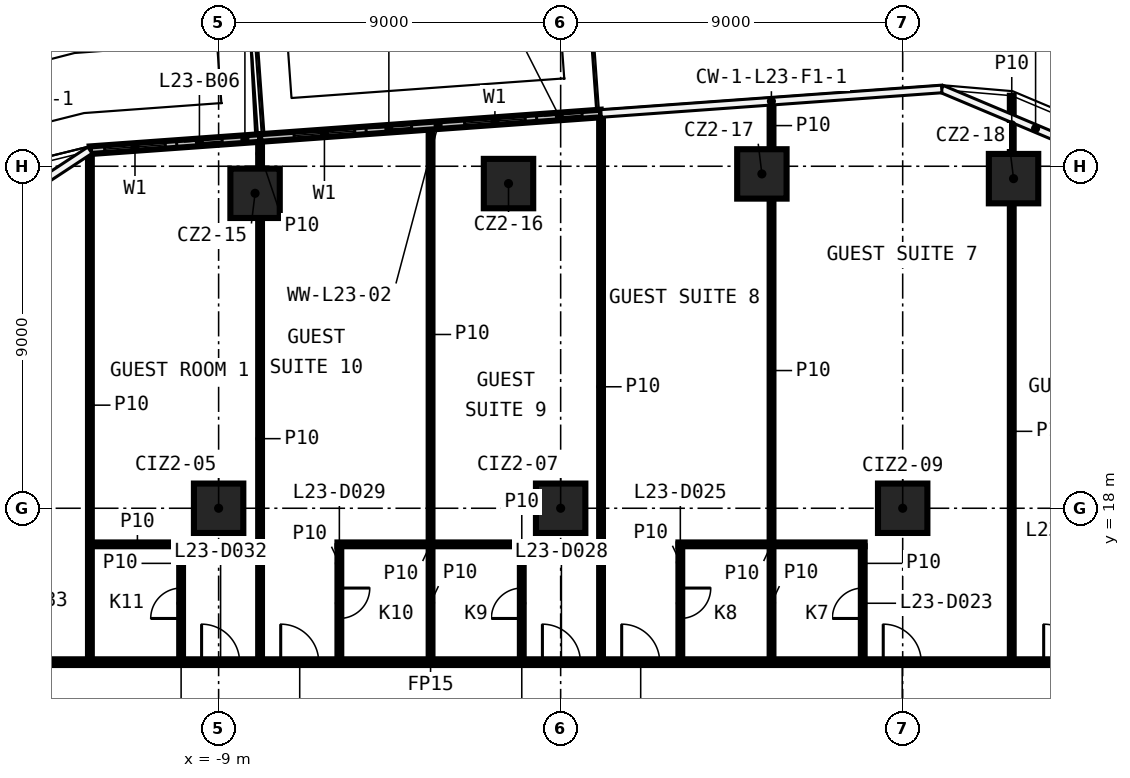
"""IFC4 building model, lengths in metres.
Left out: names, types, materials, properties, quantities, classifications, styles, units other than length and angle.
Written with IfcOpenShell. Run it as: python <this file> out.ifc"""

import sys

from ifc_helpers import new_model, si_unit, direction, frame, frame_2d, origin, origin_2d, place, context, subcontext, project, spatial, rectangle, extrude, element, fill, save


model = new_model("IFC4")
c1 = context("Model", 3, precision=1e-05, world=origin(), true_north=direction((0.0, 1.0)))
c2 = subcontext(c1, "Body", "Model", "MODEL_VIEW")
j1 = project(units=[si_unit("LENGTHUNIT", "METRE"), si_unit("PLANEANGLEUNIT", "RADIAN")], contexts=[c1])
p1 = place(None, origin())
s1 = spatial("IfcSite", under=j1, at=p1, CompositionType="ELEMENT")
p2 = place(p1, origin())
s2 = spatial("IfcBuilding", under=s1, at=p2, CompositionType="ELEMENT")
p3 = place(p2, frame((0.0, 0.0, 110.0)))
s3 = spatial("IfcBuildingStorey", under=s2, at=p3, CompositionType="ELEMENT", Elevation=110.0)
for number, where, z_axis, x_axis in (
    (1, (-8.041, 26.288, 0.0), (0.0, 0.0, 1.0), (1.0, 0.0, 0.0)),
    (2, (-1.372, 26.544, 0.0), (0.0, 0.0, 1.0), (1.0, 0.0, 0.0)),
    (3, (5.295, 26.798, 0.0), (0.0, 0.0, 1.0), (1.0, 0.0, 0.0)),
    (4, (11.917, 26.674, 0.0), (0.0, 0.0, 1.0), (1.0, 0.0, 0.0)),
    (5, (-9.0, 18.0, 0.0), (0.0, 0.0, 1.0), (1.0, 0.0, 0.0)),
    (6, (0.0, 18.0, 0.0), (0.0, 0.0, 1.0), (1.0, 0.0, 0.0)),
    (7, (9.0, 18.0, 0.0), (0.0, 0.0, 1.0), (1.0, 0.0, 0.0)),
):
    element("IfcColumn", number, at=place(p3, frame(where, z_axis=z_axis, x_axis=x_axis)), inside=s3, PredefinedType="COLUMN", context=c2, shape_type="SweptSolid", body=[
        extrude(rectangle(XDim=1.3, YDim=1.3, at=origin_2d()), origin(), (0.0, 0.0, 1.0), 3.3),
    ])
p4 = place(p3, frame((-17.025, 13.95, 0.0), z_axis=(0.0, 0.0, 1.0), x_axis=(1.0, 0.0, 0.0)))
e8 = element("IfcWall", 8, at=p4, inside=s3, PredefinedType="PARTITIONING", context=c2, shape_type="SweptSolid", body=[
    extrude(rectangle(XDim=34.05, YDim=0.15, at=frame_2d((17.025, 0.0))), origin(), (0.0, 0.0, 1.0), 3.3),
])
p5 = place(p4, frame((29.735, 0.0, 0.0)))
e9 = element("IfcOpeningElement", 9, at=p5, cuts=e8, PredefinedType="OPENING", context=c2, shape_type="SweptSolid", body=[
    extrude(rectangle(XDim=1.0, YDim=2.1, at=frame_2d((0.5, 1.05))), frame((0.0, 0.085, 0.0), z_axis=(0.0, -1.0, 0.0), x_axis=(1.0, 0.0, 0.0)), (0.0, 0.0, 1.0), 0.17),
])
p6 = place(p4, frame((25.513, 0.0, 0.0)))
e10 = element("IfcOpeningElement", 10, at=p6, cuts=e8, PredefinedType="OPENING", context=c2, shape_type="SweptSolid", body=[
    extrude(rectangle(XDim=1.0, YDim=2.1, at=frame_2d((0.5, 1.05))), frame((0.0, 0.085, 0.0), z_axis=(0.0, -1.0, 0.0), x_axis=(1.0, 0.0, 0.0)), (0.0, 0.0, 1.0), 0.17),
])
p7 = place(p4, frame((18.631, 0.0, 0.0)))
e11 = element("IfcOpeningElement", 11, at=p7, cuts=e8, PredefinedType="OPENING", context=c2, shape_type="SweptSolid", body=[
    extrude(rectangle(XDim=1.0, YDim=2.1, at=frame_2d((0.5, 1.05))), frame((0.0, 0.085, 0.0), z_axis=(0.0, -1.0, 0.0), x_axis=(1.0, 0.0, 0.0)), (0.0, 0.0, 1.0), 0.17),
])
p8 = place(p4, frame((16.545, 0.0, 0.0)))
e12 = element("IfcOpeningElement", 12, at=p8, cuts=e8, PredefinedType="OPENING", context=c2, shape_type="SweptSolid", body=[
    extrude(rectangle(XDim=1.0, YDim=2.1, at=frame_2d((0.5, 1.05))), frame((0.0, 0.085, 0.0), z_axis=(0.0, -1.0, 0.0), x_axis=(1.0, 0.0, 0.0)), (0.0, 0.0, 1.0), 0.17),
])
p9 = place(p4, frame((9.659, 0.0, 0.0)))
e13 = element("IfcOpeningElement", 13, at=p9, cuts=e8, PredefinedType="OPENING", context=c2, shape_type="SweptSolid", body=[
    extrude(rectangle(XDim=1.0, YDim=2.1, at=frame_2d((0.5, 1.05))), frame((0.0, 0.085, 0.0), z_axis=(0.0, -1.0, 0.0), x_axis=(1.0, 0.0, 0.0)), (0.0, 0.0, 1.0), 0.17),
])
p10 = place(p4, frame((7.577, 0.0, 0.0)))
e14 = element("IfcOpeningElement", 14, at=p10, cuts=e8, PredefinedType="OPENING", context=c2, shape_type="SweptSolid", body=[
    extrude(rectangle(XDim=1.0, YDim=2.1, at=frame_2d((0.5, 1.05))), frame((0.0, 0.085, 0.0), z_axis=(0.0, -1.0, 0.0), x_axis=(1.0, 0.0, 0.0)), (0.0, 0.0, 1.0), 0.17),
])
p11 = place(p4, frame((2.381, 0.0, 0.0)))
e15 = element("IfcOpeningElement", 15, at=p11, cuts=e8, PredefinedType="OPENING", context=c2, shape_type="SweptSolid", body=[
    extrude(rectangle(XDim=0.9, YDim=2.1, at=frame_2d((0.45, 1.05))), frame((0.0, 0.085, 0.0), z_axis=(0.0, -1.0, 0.0), x_axis=(1.0, 0.0, 0.0)), (0.0, 0.0, 1.0), 0.17),
])
p12 = place(p3, frame((-12.337, 17.05, 0.0), z_axis=(0.0, 0.0, 1.0), x_axis=(1.0, 0.0, 0.0)))
e16 = element("IfcWall", 16, at=p12, inside=s3, PredefinedType="PARTITIONING", context=c2, shape_type="SweptSolid", body=[
    extrude(rectangle(XDim=2.4, YDim=0.1, at=frame_2d((1.2, 0.0))), origin(), (0.0, 0.0, 1.0), 3.3),
])
for number, where, z_axis, x_axis in (
    (17, (-5.873, 17.05, 0.0), (0.0, 0.0, 1.0), (1.0, 0.0, 0.0)),
    (18, (3.099, 17.05, 0.0), (0.0, 0.0, 1.0), (1.0, 0.0, 0.0)),
):
    element("IfcWall", number, at=place(p3, frame(where, z_axis=z_axis, x_axis=x_axis)), inside=s3, PredefinedType="PARTITIONING", context=c2, shape_type="SweptSolid", body=[
        extrude(rectangle(XDim=4.9, YDim=0.1, at=frame_2d((2.45, 0.0))), origin(), (0.0, 0.0, 1.0), 3.3),
    ])
p13 = place(p3, frame((11.87, 14.025, 0.0), z_axis=(0.0, 0.0, 1.0), x_axis=(0.0, 1.0, 0.0)))
e19 = element("IfcWall", 19, at=p13, inside=s3, PredefinedType="PARTITIONING", context=c2, shape_type="SweptSolid", body=[
    extrude(rectangle(XDim=11.999, YDim=0.1, at=frame_2d((6.0, 0.0))), origin(), (0.0, 0.0, 1.0), 3.3),
])
p14 = place(p3, frame((11.87, 27.324, 0.0), z_axis=(0.0, 0.0, 1.0), x_axis=(0.0, 1.0, 0.0)))
e20 = element("IfcWall", 20, at=p14, inside=s3, PredefinedType="PARTITIONING", context=c2, shape_type="SweptSolid", body=[
    extrude(rectangle(XDim=1.531, YDim=0.1, at=frame_2d((0.766, 0.0))), origin(), (0.0, 0.0, 1.0), 3.3),
])
p15 = place(p3, frame((7.949, 14.025, 0.0), z_axis=(0.0, 0.0, 1.0), x_axis=(0.0, 1.0, 0.0)))
e21 = element("IfcWall", 21, at=p15, inside=s3, PredefinedType="PARTITIONING", context=c2, shape_type="SweptSolid", body=[
    extrude(rectangle(XDim=2.975, YDim=0.1, at=frame_2d((1.488, 0.0))), origin(), (0.0, 0.0, 1.0), 3.3),
])
p16 = place(p15, frame((1.075, 0.0, 0.0)))
e22 = element("IfcOpeningElement", 22, at=p16, cuts=e21, PredefinedType="OPENING", context=c2, shape_type="SweptSolid", body=[
    extrude(rectangle(XDim=0.8, YDim=2.1, at=frame_2d((0.4, 1.05))), frame((0.0, 0.06, 0.0), z_axis=(0.0, -1.0, 0.0), x_axis=(1.0, 0.0, 0.0)), (0.0, 0.0, 1.0), 0.12),
])
p17 = place(p3, frame((5.549, 14.025, 0.0), z_axis=(0.0, 0.0, 1.0), x_axis=(0.0, 1.0, 0.0)))
e23 = element("IfcWall", 23, at=p17, inside=s3, PredefinedType="PARTITIONING", context=c2, shape_type="SweptSolid", body=[
    extrude(rectangle(XDim=2.975, YDim=0.1, at=frame_2d((1.488, 0.0))), origin(), (0.0, 0.0, 1.0), 3.3),
])
p18 = place(p3, frame((5.549, 17.1, 0.0), z_axis=(0.0, 0.0, 1.0), x_axis=(0.0, 1.0, 0.0)))
e24 = element("IfcWall", 24, at=p18, inside=s3, PredefinedType="PARTITIONING", context=c2, shape_type="SweptSolid", body=[
    extrude(rectangle(XDim=9.048, YDim=0.1, at=frame_2d((4.524, 0.0))), origin(), (0.0, 0.0, 1.0), 3.3),
])
p19 = place(p3, frame((5.549, 27.448, 0.0), z_axis=(0.0, 0.0, 1.0), x_axis=(0.0, 1.0, 0.0)))
e25 = element("IfcWall", 25, at=p19, inside=s3, PredefinedType="PARTITIONING", context=c2, shape_type="SweptSolid", body=[
    extrude(rectangle(XDim=1.243, YDim=0.1, at=frame_2d((0.622, 0.0))), origin(), (0.0, 0.0, 1.0), 3.3),
])
p20 = place(p3, frame((3.149, 17.05, 0.0), z_axis=(0.0, 0.0, 1.0), x_axis=(0.0, -1.0, 0.0)))
e26 = element("IfcWall", 26, at=p20, inside=s3, PredefinedType="PARTITIONING", context=c2, shape_type="SweptSolid", body=[
    extrude(rectangle(XDim=3.025, YDim=0.1, at=frame_2d((1.513, 0.0))), origin(), (0.0, 0.0, 1.0), 3.3),
])
p21 = place(p20, frame((1.15, 0.0, 0.0)))
e27 = element("IfcOpeningElement", 27, at=p21, cuts=e26, PredefinedType="OPENING", context=c2, shape_type="SweptSolid", body=[
    extrude(rectangle(XDim=0.8, YDim=2.1, at=frame_2d((0.4, 1.05))), frame((0.0, 0.06, 0.0), z_axis=(0.0, -1.0, 0.0), x_axis=(1.0, 0.0, 0.0)), (0.0, 0.0, 1.0), 0.12),
])
p22 = place(p3, frame((1.063, 14.025, 0.0), z_axis=(0.0, 0.0, 1.0), x_axis=(0.0, 1.0, 0.0)))
e28 = element("IfcWall", 28, at=p22, inside=s3, PredefinedType="PARTITIONING", context=c2, shape_type="SweptSolid", body=[
    extrude(rectangle(XDim=14.344, YDim=0.1, at=frame_2d((7.172, 0.0))), origin(), (0.0, 0.0, 1.0), 3.3),
])
p23 = place(p3, frame((-1.023, 14.025, 0.0), z_axis=(0.0, 0.0, 1.0), x_axis=(0.0, 1.0, 0.0)))
e29 = element("IfcWall", 29, at=p23, inside=s3, PredefinedType="PARTITIONING", context=c2, shape_type="SweptSolid", body=[
    extrude(rectangle(XDim=3.025, YDim=0.1, at=frame_2d((1.513, 0.0))), origin(), (0.0, 0.0, 1.0), 3.3),
])
p24 = place(p23, frame((1.075, 0.0, 0.0)))
e30 = element("IfcOpeningElement", 30, at=p24, cuts=e29, PredefinedType="OPENING", context=c2, shape_type="SweptSolid", body=[
    extrude(rectangle(XDim=0.8, YDim=2.1, at=frame_2d((0.4, 1.05))), frame((0.0, 0.06, 0.0), z_axis=(0.0, -1.0, 0.0), x_axis=(1.0, 0.0, 0.0)), (0.0, 0.0, 1.0), 0.12),
])
p25 = place(p3, frame((-3.423, 14.025, 0.0), z_axis=(0.0, 0.0, 1.0), x_axis=(0.0, 1.0, 0.0)))
e31 = element("IfcWall", 31, at=p25, inside=s3, PredefinedType="PARTITIONING", context=c2, shape_type="SweptSolid", body=[
    extrude(rectangle(XDim=2.975, YDim=0.1, at=frame_2d((1.488, 0.0))), origin(), (0.0, 0.0, 1.0), 3.3),
])
p26 = place(p3, frame((-3.423, 17.1, 0.0), z_axis=(0.0, 0.0, 1.0), x_axis=(0.0, 1.0, 0.0)))
e32 = element("IfcWall", 32, at=p26, inside=s3, PredefinedType="PARTITIONING", context=c2, shape_type="SweptSolid", body=[
    extrude(rectangle(XDim=10.946, YDim=0.1, at=frame_2d((5.473, 0.0))), origin(), (0.0, 0.0, 1.0), 3.3),
])
p27 = place(p3, frame((-5.823, 17.0, 0.0), z_axis=(0.0, 0.0, 1.0), x_axis=(0.0, -1.0, 0.0)))
e33 = element("IfcWall", 33, at=p27, inside=s3, PredefinedType="PARTITIONING", context=c2, shape_type="SweptSolid", body=[
    extrude(rectangle(XDim=2.975, YDim=0.1, at=frame_2d((1.488, 0.0))), origin(), (0.0, 0.0, 1.0), 3.3),
])
p28 = place(p27, frame((1.1, 0.0, 0.0)))
e34 = element("IfcOpeningElement", 34, at=p28, cuts=e33, PredefinedType="OPENING", context=c2, shape_type="SweptSolid", body=[
    extrude(rectangle(XDim=0.8, YDim=2.1, at=frame_2d((0.4, 1.05))), frame((0.0, 0.06, 0.0), z_axis=(0.0, -1.0, 0.0), x_axis=(1.0, 0.0, 0.0)), (0.0, 0.0, 1.0), 0.12),
])
p29 = place(p3, frame((-7.909, 14.025, 0.0), z_axis=(0.0, 0.0, 1.0), x_axis=(0.0, 1.0, 0.0)))
e35 = element("IfcWall", 35, at=p29, inside=s3, PredefinedType="PARTITIONING", context=c2, shape_type="SweptSolid", body=[
    extrude(rectangle(XDim=11.613, YDim=0.1, at=frame_2d((5.807, 0.0))), origin(), (0.0, 0.0, 1.0), 3.3),
])
p30 = place(p3, frame((-7.909, 26.938, 0.0), z_axis=(0.0, 0.0, 1.0), x_axis=(0.0, 1.0, 0.0)))
e36 = element("IfcWall", 36, at=p30, inside=s3, PredefinedType="PARTITIONING", context=c2, shape_type="SweptSolid", body=[
    extrude(rectangle(XDim=0.785, YDim=0.1, at=frame_2d((0.393, 0.0))), origin(), (0.0, 0.0, 1.0), 3.3),
])
p31 = place(p3, frame((-9.987, 14.025, 0.0), z_axis=(0.0, 0.0, 1.0), x_axis=(0.0, 1.0, 0.0)))
e37 = element("IfcWall", 37, at=p31, inside=s3, PredefinedType="PARTITIONING", context=c2, shape_type="SweptSolid", body=[
    extrude(rectangle(XDim=2.975, YDim=0.1, at=frame_2d((1.488, 0.0))), origin(), (0.0, 0.0, 1.0), 3.3),
])
p32 = place(p31, frame((1.075, 0.0, 0.0)))
e38 = element("IfcOpeningElement", 38, at=p32, cuts=e37, PredefinedType="OPENING", context=c2, shape_type="SweptSolid", body=[
    extrude(rectangle(XDim=0.8, YDim=2.1, at=frame_2d((0.4, 1.05))), frame((0.0, 0.06, 0.0), z_axis=(0.0, -1.0, 0.0), x_axis=(1.0, 0.0, 0.0)), (0.0, 0.0, 1.0), 0.12),
])
p33 = place(p3, frame((-12.387, 14.025, 0.0), z_axis=(0.0, 0.0, 1.0), x_axis=(0.0, 1.0, 0.0)))
e39 = element("IfcWall", 39, at=p33, inside=s3, PredefinedType="PARTITIONING", context=c2, shape_type="SweptSolid", body=[
    extrude(rectangle(XDim=13.376, YDim=0.1, at=frame_2d((6.688, 0.0))), origin(), (0.0, 0.0, 1.0), 3.3),
])
p34 = place(p3, frame((1.063, 28.389, 0.0), z_axis=(0.0, 0.0, 1.0), x_axis=(-0.997421921005, -0.071760096847, 0.0)))
e40 = element("IfcWall", 40, at=p34, inside=s3, PredefinedType="SOLIDWALL", context=c2, shape_type="SweptSolid", body=[
    extrude(rectangle(XDim=8.995, YDim=0.2, at=frame_2d((4.498, 0.0))), origin(), (0.0, 0.0, 1.0), 3.3),
])
p35 = place(p34, frame((2.0, 0.0, 0.6)))
e41 = element("IfcOpeningElement", 41, at=p35, cuts=e40, PredefinedType="OPENING", context=c2, shape_type="SweptSolid", body=[
    extrude(rectangle(XDim=1.6, YDim=2.4, at=frame_2d((0.8, 1.2))), frame((0.0, 0.11, 0.0), z_axis=(0.0, -1.0, 0.0), x_axis=(1.0, 0.0, 0.0)), (0.0, 0.0, 1.0), 0.22),
])
p36 = place(p34, frame((0.5, 0.0, 0.0)))
e42 = element("IfcOpeningElement", 42, at=p36, cuts=e40, PredefinedType="OPENING", context=c2, shape_type="SweptSolid", body=[
    extrude(rectangle(XDim=1.2, YDim=2.4, at=frame_2d((0.6, 1.2))), frame((0.0, 0.11, 0.0), z_axis=(0.0, -1.0, 0.0), x_axis=(1.0, 0.0, 0.0)), (0.0, 0.0, 1.0), 0.22),
])
p37 = place(p34, frame((6.498, 0.0, 0.6)))
e43 = element("IfcOpeningElement", 43, at=p37, cuts=e40, PredefinedType="OPENING", context=c2, shape_type="SweptSolid", body=[
    extrude(rectangle(XDim=1.6, YDim=2.4, at=frame_2d((0.8, 1.2))), frame((0.0, 0.11, 0.0), z_axis=(0.0, -1.0, 0.0), x_axis=(1.0, 0.0, 0.0)), (0.0, 0.0, 1.0), 0.22),
])
p38 = place(p34, frame((4.998, 0.0, 0.0)))
e44 = element("IfcOpeningElement", 44, at=p38, cuts=e40, PredefinedType="OPENING", context=c2, shape_type="SweptSolid", body=[
    extrude(rectangle(XDim=1.2, YDim=2.4, at=frame_2d((0.6, 1.2))), frame((0.0, 0.11, 0.0), z_axis=(0.0, -1.0, 0.0), x_axis=(1.0, 0.0, 0.0)), (0.0, 0.0, 1.0), 0.22),
])
p39 = place(p3, frame((-7.909, 27.743, 0.0), z_axis=(0.0, 0.0, 1.0), x_axis=(-0.997423796537, -0.071734023317, 0.0)))
e45 = element("IfcWall", 45, at=p39, inside=s3, PredefinedType="SOLIDWALL", context=c2, shape_type="SweptSolid", body=[
    extrude(rectangle(XDim=4.489, YDim=0.2, at=frame_2d((2.245, 0.0))), origin(), (0.0, 0.0, 1.0), 3.3),
])
p40 = place(p39, frame((2.5, 0.0, 0.6)))
e46 = element("IfcOpeningElement", 46, at=p40, cuts=e45, PredefinedType="OPENING", context=c2, shape_type="SweptSolid", body=[
    extrude(rectangle(XDim=1.6, YDim=2.4, at=frame_2d((0.8, 1.2))), frame((0.0, 0.11, 0.0), z_axis=(0.0, -1.0, 0.0), x_axis=(1.0, 0.0, 0.0)), (0.0, 0.0, 1.0), 0.22),
])
p41 = place(p39, frame((1.0, 0.0, 0.0)))
e47 = element("IfcOpeningElement", 47, at=p41, cuts=e45, PredefinedType="OPENING", context=c2, shape_type="SweptSolid", body=[
    extrude(rectangle(XDim=1.2, YDim=2.4, at=frame_2d((0.6, 1.2))), frame((0.0, 0.11, 0.0), z_axis=(0.0, -1.0, 0.0), x_axis=(1.0, 0.0, 0.0)), (0.0, 0.0, 1.0), 0.22),
])
p42 = place(p5, origin())
e48 = element("IfcDoor", 48, at=p42, inside=s3, OperationType="SINGLE_SWING_RIGHT", PredefinedType="DOOR", context=c2, shape_type="SweptSolid", body=[
    extrude(rectangle(XDim=1.0, YDim=2.1, at=frame_2d((0.5, 1.05))), frame((0.0, 0.025, 0.0), z_axis=(0.0, -1.0, 0.0), x_axis=(1.0, 0.0, 0.0)), (0.0, 0.0, 1.0), 0.05),
])
fill(e9, e48)
p43 = place(p16, origin())
e49 = element("IfcDoor", 49, at=p43, inside=s3, OperationType="SINGLE_SWING_RIGHT", PredefinedType="DOOR", context=c2, shape_type="SweptSolid", body=[
    extrude(rectangle(XDim=0.8, YDim=2.1, at=frame_2d((0.4, 1.05))), frame((0.0, 0.025, 0.0), z_axis=(0.0, -1.0, 0.0), x_axis=(1.0, 0.0, 0.0)), (0.0, 0.0, 1.0), 0.05),
])
fill(e22, e49)
p44 = place(p6, origin())
e50 = element("IfcDoor", 50, at=p44, inside=s3, OperationType="SINGLE_SWING_LEFT", PredefinedType="DOOR", context=c2, shape_type="SweptSolid", body=[
    extrude(rectangle(XDim=1.0, YDim=2.1, at=frame_2d((0.5, 1.05))), frame((0.0, 0.025, 0.0), z_axis=(0.0, -1.0, 0.0), x_axis=(1.0, 0.0, 0.0)), (0.0, 0.0, 1.0), 0.05),
])
fill(e10, e50)
p45 = place(p21, origin())
e51 = element("IfcDoor", 51, at=p45, inside=s3, OperationType="SINGLE_SWING_LEFT", PredefinedType="DOOR", context=c2, shape_type="SweptSolid", body=[
    extrude(rectangle(XDim=0.8, YDim=2.1, at=frame_2d((0.4, 1.05))), frame((0.0, 0.025, 0.0), z_axis=(0.0, -1.0, 0.0), x_axis=(1.0, 0.0, 0.0)), (0.0, 0.0, 1.0), 0.05),
])
fill(e27, e51)
p46 = place(p7, origin())
e52 = element("IfcDoor", 52, at=p46, inside=s3, OperationType="SINGLE_SWING_RIGHT", PredefinedType="DOOR", context=c2, shape_type="SweptSolid", body=[
    extrude(rectangle(XDim=1.0, YDim=2.1, at=frame_2d((0.5, 1.05))), frame((0.0, 0.025, 0.0), z_axis=(0.0, -1.0, 0.0), x_axis=(1.0, 0.0, 0.0)), (0.0, 0.0, 1.0), 0.05),
])
fill(e11, e52)
p47 = place(p24, origin())
e53 = element("IfcDoor", 53, at=p47, inside=s3, OperationType="SINGLE_SWING_RIGHT", PredefinedType="DOOR", context=c2, shape_type="SweptSolid", body=[
    extrude(rectangle(XDim=0.8, YDim=2.1, at=frame_2d((0.4, 1.05))), frame((0.0, 0.025, 0.0), z_axis=(0.0, -1.0, 0.0), x_axis=(1.0, 0.0, 0.0)), (0.0, 0.0, 1.0), 0.05),
])
fill(e30, e53)
p48 = place(p8, origin())
e54 = element("IfcDoor", 54, at=p48, inside=s3, OperationType="SINGLE_SWING_LEFT", PredefinedType="DOOR", context=c2, shape_type="SweptSolid", body=[
    extrude(rectangle(XDim=1.0, YDim=2.1, at=frame_2d((0.5, 1.05))), frame((0.0, 0.025, 0.0), z_axis=(0.0, -1.0, 0.0), x_axis=(1.0, 0.0, 0.0)), (0.0, 0.0, 1.0), 0.05),
])
fill(e12, e54)
p49 = place(p28, origin())
e55 = element("IfcDoor", 55, at=p49, inside=s3, OperationType="SINGLE_SWING_LEFT", PredefinedType="DOOR", context=c2, shape_type="SweptSolid", body=[
    extrude(rectangle(XDim=0.8, YDim=2.1, at=frame_2d((0.4, 1.05))), frame((0.0, 0.025, 0.0), z_axis=(0.0, -1.0, 0.0), x_axis=(1.0, 0.0, 0.0)), (0.0, 0.0, 1.0), 0.05),
])
fill(e34, e55)
p50 = place(p9, origin())
e56 = element("IfcDoor", 56, at=p50, inside=s3, OperationType="SINGLE_SWING_RIGHT", PredefinedType="DOOR", context=c2, shape_type="SweptSolid", body=[
    extrude(rectangle(XDim=1.0, YDim=2.1, at=frame_2d((0.5, 1.05))), frame((0.0, 0.025, 0.0), z_axis=(0.0, -1.0, 0.0), x_axis=(1.0, 0.0, 0.0)), (0.0, 0.0, 1.0), 0.05),
])
fill(e13, e56)
p51 = place(p32, origin())
e57 = element("IfcDoor", 57, at=p51, inside=s3, OperationType="SINGLE_SWING_RIGHT", PredefinedType="DOOR", context=c2, shape_type="SweptSolid", body=[
    extrude(rectangle(XDim=0.8, YDim=2.1, at=frame_2d((0.4, 1.05))), frame((0.0, 0.025, 0.0), z_axis=(0.0, -1.0, 0.0), x_axis=(1.0, 0.0, 0.0)), (0.0, 0.0, 1.0), 0.05),
])
fill(e38, e57)
p52 = place(p10, origin())
e58 = element("IfcDoor", 58, at=p52, inside=s3, OperationType="SINGLE_SWING_LEFT", PredefinedType="DOOR", context=c2, shape_type="SweptSolid", body=[
    extrude(rectangle(XDim=1.0, YDim=2.1, at=frame_2d((0.5, 1.05))), frame((0.0, 0.025, 0.0), z_axis=(0.0, -1.0, 0.0), x_axis=(1.0, 0.0, 0.0)), (0.0, 0.0, 1.0), 0.05),
])
fill(e14, e58)
p53 = place(p35, origin())
e59 = element("IfcWindow", 59, at=p53, inside=s3, PartitioningType="SINGLE_PANEL", PredefinedType="WINDOW", context=c2, shape_type="SweptSolid", body=[
    extrude(rectangle(XDim=1.6, YDim=2.4, at=frame_2d((0.8, 1.2))), frame((0.0, 0.03, 0.0), z_axis=(0.0, -1.0, 0.0), x_axis=(1.0, 0.0, 0.0)), (0.0, 0.0, 1.0), 0.06),
])
fill(e41, e59)
p54 = place(p36, origin())
e60 = element("IfcDoor", 60, at=p54, inside=s3, OperationType="SLIDING_TO_LEFT", PredefinedType="DOOR", context=c2, shape_type="SweptSolid", body=[
    extrude(rectangle(XDim=1.2, YDim=2.4, at=frame_2d((0.6, 1.2))), frame((0.0, 0.025, 0.0), z_axis=(0.0, -1.0, 0.0), x_axis=(1.0, 0.0, 0.0)), (0.0, 0.0, 1.0), 0.05),
])
fill(e42, e60)
p55 = place(p37, origin())
e61 = element("IfcWindow", 61, at=p55, inside=s3, PartitioningType="SINGLE_PANEL", PredefinedType="WINDOW", context=c2, shape_type="SweptSolid", body=[
    extrude(rectangle(XDim=1.6, YDim=2.4, at=frame_2d((0.8, 1.2))), frame((0.0, 0.03, 0.0), z_axis=(0.0, -1.0, 0.0), x_axis=(1.0, 0.0, 0.0)), (0.0, 0.0, 1.0), 0.06),
])
fill(e43, e61)
p56 = place(p38, origin())
e62 = element("IfcDoor", 62, at=p56, inside=s3, OperationType="SLIDING_TO_LEFT", PredefinedType="DOOR", context=c2, shape_type="SweptSolid", body=[
    extrude(rectangle(XDim=1.2, YDim=2.4, at=frame_2d((0.6, 1.2))), frame((0.0, 0.025, 0.0), z_axis=(0.0, -1.0, 0.0), x_axis=(1.0, 0.0, 0.0)), (0.0, 0.0, 1.0), 0.05),
])
fill(e44, e62)
p57 = place(p40, origin())
e63 = element("IfcWindow", 63, at=p57, inside=s3, PartitioningType="SINGLE_PANEL", PredefinedType="WINDOW", context=c2, shape_type="SweptSolid", body=[
    extrude(rectangle(XDim=1.6, YDim=2.4, at=frame_2d((0.8, 1.2))), frame((0.0, 0.03, 0.0), z_axis=(0.0, -1.0, 0.0), x_axis=(1.0, 0.0, 0.0)), (0.0, 0.0, 1.0), 0.06),
])
fill(e46, e63)
p58 = place(p41, origin())
e64 = element("IfcDoor", 64, at=p58, inside=s3, OperationType="SLIDING_TO_LEFT", PredefinedType="DOOR", context=c2, shape_type="SweptSolid", body=[
    extrude(rectangle(XDim=1.2, YDim=2.4, at=frame_2d((0.6, 1.2))), frame((0.0, 0.025, 0.0), z_axis=(0.0, -1.0, 0.0), x_axis=(1.0, 0.0, 0.0)), (0.0, 0.0, 1.0), 0.05),
])
fill(e47, e64)
save(model, sys.argv[1])
